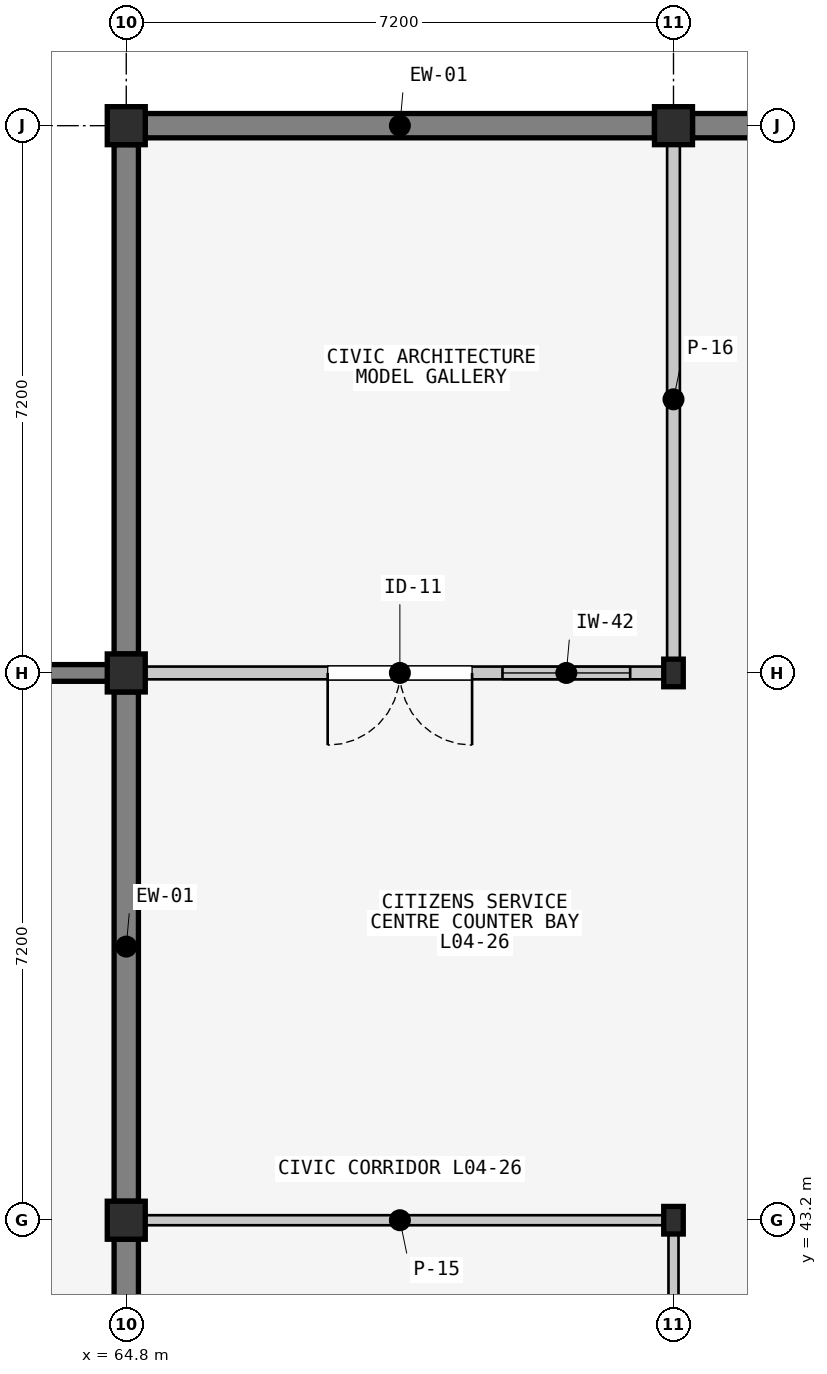
"""IFC4 building model, lengths in metres.
Left out: names, types, materials, properties, quantities, classifications, styles, units other than length and angle.
Written with IfcOpenShell. Run it as: python <this file> out.ifc"""

import sys

from ifc_helpers import new_model, si_unit, direction, frame, frame_2d, origin, origin_2d, place, context, subcontext, project, spatial, rectangle, i_section, extrude, element, fill, save


model = new_model("IFC4")
c1 = context("Model", 3, precision=1e-05, world=origin(), true_north=direction((0.0, 1.0)))
c2 = subcontext(c1, "Body", "Model", "MODEL_VIEW")
j1 = project(units=[si_unit("LENGTHUNIT", "METRE"), si_unit("PLANEANGLEUNIT", "RADIAN")], contexts=[c1])
p1 = place(None, origin())
s1 = spatial("IfcSite", under=j1, at=p1, CompositionType="ELEMENT")
p2 = place(p1, origin())
s2 = spatial("IfcBuilding", under=s1, at=p2, CompositionType="ELEMENT")
p3 = place(p2, frame((0.0, 0.0, 14.1)))
s3 = spatial("IfcBuildingStorey", under=s2, at=p3, CompositionType="ELEMENT", Elevation=14.1)
p4 = place(p3, frame((64.8, 43.2, 0.0), z_axis=(0.0, 0.0, 1.0), x_axis=(1.0, 0.0, 0.0)))
e1 = element("IfcColumn", 1, at=p4, inside=s3, PredefinedType="COLUMN", context=c2, shape_type="SweptSolid", body=[
    extrude(rectangle(XDim=0.5, YDim=0.5, at=origin_2d()), origin(), (0.0, 0.0, 1.0), 11.59),
])
p5 = place(p3, frame((64.8, 50.4, 0.0), z_axis=(0.0, 0.0, 1.0), x_axis=(1.0, 0.0, 0.0)))
e2 = element("IfcColumn", 2, at=p5, inside=s3, PredefinedType="COLUMN", context=c2, shape_type="SweptSolid", body=[
    extrude(rectangle(XDim=0.5, YDim=0.5, at=origin_2d()), origin(), (0.0, 0.0, 1.0), 12.933),
])
p6 = place(p3, frame((64.8, 57.6, 0.0), z_axis=(0.0, 0.0, 1.0), x_axis=(1.0, 0.0, 0.0)))
e3 = element("IfcColumn", 3, at=p6, inside=s3, PredefinedType="COLUMN", context=c2, shape_type="SweptSolid", body=[
    extrude(rectangle(XDim=0.5, YDim=0.5, at=origin_2d()), origin(), (0.0, 0.0, 1.0), 14.276),
])
p7 = place(p3, frame((72.0, 43.2, 0.0), z_axis=(0.0, 0.0, 1.0), x_axis=(1.0, 0.0, 0.0)))
e4 = element("IfcColumn", 4, at=p7, inside=s3, PredefinedType="COLUMN", context=c2, shape_type="SweptSolid", body=[
    extrude(i_section(OverallWidth=0.257, OverallDepth=0.363, WebThickness=0.013, FlangeThickness=0.022, FilletRadius=0.015, at=origin_2d()), origin(), (0.0, 0.0, 1.0), 11.619),
])
p8 = place(p3, frame((72.0, 50.4, 0.0), z_axis=(0.0, 0.0, 1.0), x_axis=(1.0, 0.0, 0.0)))
e5 = element("IfcColumn", 5, at=p8, inside=s3, PredefinedType="COLUMN", context=c2, shape_type="SweptSolid", body=[
    extrude(i_section(OverallWidth=0.257, OverallDepth=0.363, WebThickness=0.013, FlangeThickness=0.022, FilletRadius=0.015, at=origin_2d()), origin(), (0.0, 0.0, 1.0), 12.962),
])
p9 = place(p3, frame((72.0, 57.6, 0.0), z_axis=(0.0, 0.0, 1.0), x_axis=(1.0, 0.0, 0.0)))
e6 = element("IfcColumn", 6, at=p9, inside=s3, PredefinedType="COLUMN", context=c2, shape_type="SweptSolid", body=[
    extrude(rectangle(XDim=0.5, YDim=0.5, at=origin_2d()), origin(), (0.0, 0.0, 1.0), 14.305),
])
p10 = place(p3, frame((64.8, 36.25, 0.0), z_axis=(0.0, 0.0, 1.0), x_axis=(0.0, 1.0, 0.0)))
e7 = element("IfcWall", 7, at=p10, inside=s3, PredefinedType="SOLIDWALL", context=c2, shape_type="SweptSolid", body=[
    extrude(rectangle(XDim=6.7, YDim=0.32, at=frame_2d((3.35, 0.0))), origin(), (0.0, 0.0, 1.0), 9.565),
])
p11 = place(p3, frame((64.8, 43.45, 0.0), z_axis=(0.0, 0.0, 1.0), x_axis=(0.0, 1.0, 0.0)))
e8 = element("IfcWall", 8, at=p11, inside=s3, PredefinedType="SOLIDWALL", context=c2, shape_type="SweptSolid", body=[
    extrude(rectangle(XDim=6.7, YDim=0.32, at=frame_2d((3.35, 0.0))), origin(), (0.0, 0.0, 1.0), 10.907),
])
p12 = place(p3, frame((65.05, 57.6, 0.0), z_axis=(0.0, 0.0, 1.0), x_axis=(1.0, 0.0, 0.0)))
e9 = element("IfcWall", 9, at=p12, inside=s3, PredefinedType="SOLIDWALL", context=c2, shape_type="SweptSolid", body=[
    extrude(rectangle(XDim=6.7, YDim=0.32, at=frame_2d((3.35, 0.0))), origin(), (0.0, 0.0, 1.0), 13.549),
])
p13 = place(p3, frame((64.8, 50.65, 0.0), z_axis=(0.0, 0.0, 1.0), x_axis=(0.0, 1.0, 0.0)))
e10 = element("IfcWall", 10, at=p13, inside=s3, PredefinedType="SOLIDWALL", context=c2, shape_type="SweptSolid", body=[
    extrude(rectangle(XDim=6.7, YDim=0.32, at=frame_2d((3.35, 0.0))), origin(), (0.0, 0.0, 1.0), 12.25),
])
p14 = place(p3, frame((72.25, 57.6, 0.0), z_axis=(0.0, 0.0, 1.0), x_axis=(1.0, 0.0, 0.0)))
e11 = element("IfcWall", 11, at=p14, inside=s3, PredefinedType="SOLIDWALL", context=c2, shape_type="SweptSolid", body=[
    extrude(rectangle(XDim=6.7, YDim=0.32, at=frame_2d((3.35, 0.0))), origin(), (0.0, 0.0, 1.0), 13.578),
])
p15 = place(p14, frame((0.908, 0.0, 0.95)))
e12 = element("IfcOpeningElement", 12, at=p15, cuts=e11, PredefinedType="OPENING", context=c2, shape_type="SweptSolid", body=[
    extrude(rectangle(XDim=1.4, YDim=2.1, at=frame_2d((0.7, 1.05))), frame((0.0, 0.17, 0.0), z_axis=(0.0, -1.0, 0.0), x_axis=(1.0, 0.0, 0.0)), (0.0, 0.0, 1.0), 0.34),
])
p16 = place(p14, frame((0.908, 0.0, 4.55)))
e13 = element("IfcOpeningElement", 13, at=p16, cuts=e11, PredefinedType="OPENING", context=c2, shape_type="SweptSolid", body=[
    extrude(rectangle(XDim=1.4, YDim=2.1, at=frame_2d((0.7, 1.05))), frame((0.0, 0.17, 0.0), z_axis=(0.0, -1.0, 0.0), x_axis=(1.0, 0.0, 0.0)), (0.0, 0.0, 1.0), 0.34),
])
p17 = place(p14, frame((4.392, 0.0, 0.95)))
e14 = element("IfcOpeningElement", 14, at=p17, cuts=e11, PredefinedType="OPENING", context=c2, shape_type="SweptSolid", body=[
    extrude(rectangle(XDim=1.4, YDim=2.1, at=frame_2d((0.7, 1.05))), frame((0.0, 0.17, 0.0), z_axis=(0.0, -1.0, 0.0), x_axis=(1.0, 0.0, 0.0)), (0.0, 0.0, 1.0), 0.34),
])
p18 = place(p14, frame((4.392, 0.0, 4.55)))
e15 = element("IfcOpeningElement", 15, at=p18, cuts=e11, PredefinedType="OPENING", context=c2, shape_type="SweptSolid", body=[
    extrude(rectangle(XDim=1.4, YDim=2.1, at=frame_2d((0.7, 1.05))), frame((0.0, 0.17, 0.0), z_axis=(0.0, -1.0, 0.0), x_axis=(1.0, 0.0, 0.0)), (0.0, 0.0, 1.0), 0.34),
])
p19 = place(p3, frame((57.75, 50.4, 0.0), z_axis=(0.0, 0.0, 1.0), x_axis=(1.0, 0.0, 0.0)))
e16 = element("IfcWall", 16, at=p19, inside=s3, PredefinedType="PARAPET", context=c2, shape_type="SweptSolid", body=[
    extrude(rectangle(XDim=6.9, YDim=0.22, at=frame_2d((3.45, 0.0))), origin(), (0.0, 0.0, 1.0), 0.85),
])
for number, where, z_axis, x_axis in (
    (17, (72.0, 43.08, 0.0), (0.0, 0.0, 1.0), (0.0, -1.0, 0.0)),
    (18, (64.92, 43.2, 0.0), (0.0, 0.0, 1.0), (1.0, 0.0, 0.0)),
):
    element("IfcWall", number, at=place(p3, frame(where, z_axis=z_axis, x_axis=x_axis)), inside=s3, PredefinedType="PARTITIONING", context=c2, shape_type="SweptSolid", body=[
        extrude(rectangle(XDim=6.96, YDim=0.132, at=frame_2d((3.48, 0.0))), origin(), (0.0, 0.0, 1.0), 3.72),
    ])
p20 = place(p3, frame((71.88, 50.4, 0.0), z_axis=(0.0, 0.0, 1.0), x_axis=(-1.0, 0.0, 0.0)))
e19 = element("IfcWall", 19, at=p20, inside=s3, PredefinedType="PARTITIONING", context=c2, shape_type="SweptSolid", body=[
    extrude(rectangle(XDim=6.96, YDim=0.168, at=frame_2d((3.48, 0.0))), origin(), (0.0, 0.0, 1.0), 3.72),
])
p21 = place(p20, frame((2.53, 0.0, 0.0)))
e20 = element("IfcOpeningElement", 20, at=p21, cuts=e19, PredefinedType="OPENING", context=c2, shape_type="SweptSolid", body=[
    extrude(rectangle(XDim=1.9, YDim=2.45, at=frame_2d((0.95, 1.225))), frame((0.0, 0.094, 0.0), z_axis=(0.0, -1.0, 0.0), x_axis=(1.0, 0.0, 0.0)), (0.0, 0.0, 1.0), 0.188),
])
p22 = place(p20, frame((0.45, 0.0, 1.05)))
e21 = element("IfcOpeningElement", 21, at=p22, cuts=e19, PredefinedType="OPENING", context=c2, shape_type="SweptSolid", body=[
    extrude(rectangle(XDim=1.68, YDim=1.34, at=frame_2d((0.84, 0.67))), frame((0.0, 0.094, 0.0), z_axis=(0.0, -1.0, 0.0), x_axis=(1.0, 0.0, 0.0)), (0.0, 0.0, 1.0), 0.188),
])
p23 = place(p3, frame((72.0, 57.48, 0.0), z_axis=(0.0, 0.0, 1.0), x_axis=(0.0, -1.0, 0.0)))
e22 = element("IfcWall", 22, at=p23, inside=s3, PredefinedType="PARTITIONING", context=c2, shape_type="SweptSolid", body=[
    extrude(rectangle(XDim=6.96, YDim=0.168, at=frame_2d((3.48, 0.0))), origin(), (0.0, 0.0, 1.0), 3.72),
])
p24 = place(p21, origin())
e23 = element("IfcDoor", 23, at=p24, inside=s3, OperationType="DOUBLE_DOOR_SINGLE_SWING", PredefinedType="DOOR", context=c2, shape_type="SweptSolid", body=[
    extrude(rectangle(XDim=1.9, YDim=2.45, at=frame_2d((0.95, 1.225))), frame((0.0, 0.025, 0.0), z_axis=(0.0, -1.0, 0.0), x_axis=(1.0, 0.0, 0.0)), (0.0, 0.0, 1.0), 0.05),
])
fill(e20, e23)
p25 = place(p22, origin())
e24 = element("IfcWindow", 24, at=p25, inside=s3, PartitioningType="SINGLE_PANEL", PredefinedType="WINDOW", context=c2, shape_type="SweptSolid", body=[
    extrude(rectangle(XDim=1.68, YDim=1.34, at=frame_2d((0.84, 0.67))), frame((0.0, 0.03, 0.0), z_axis=(0.0, -1.0, 0.0), x_axis=(1.0, 0.0, 0.0)), (0.0, 0.0, 1.0), 0.06),
])
fill(e21, e24)
save(model, sys.argv[1])
